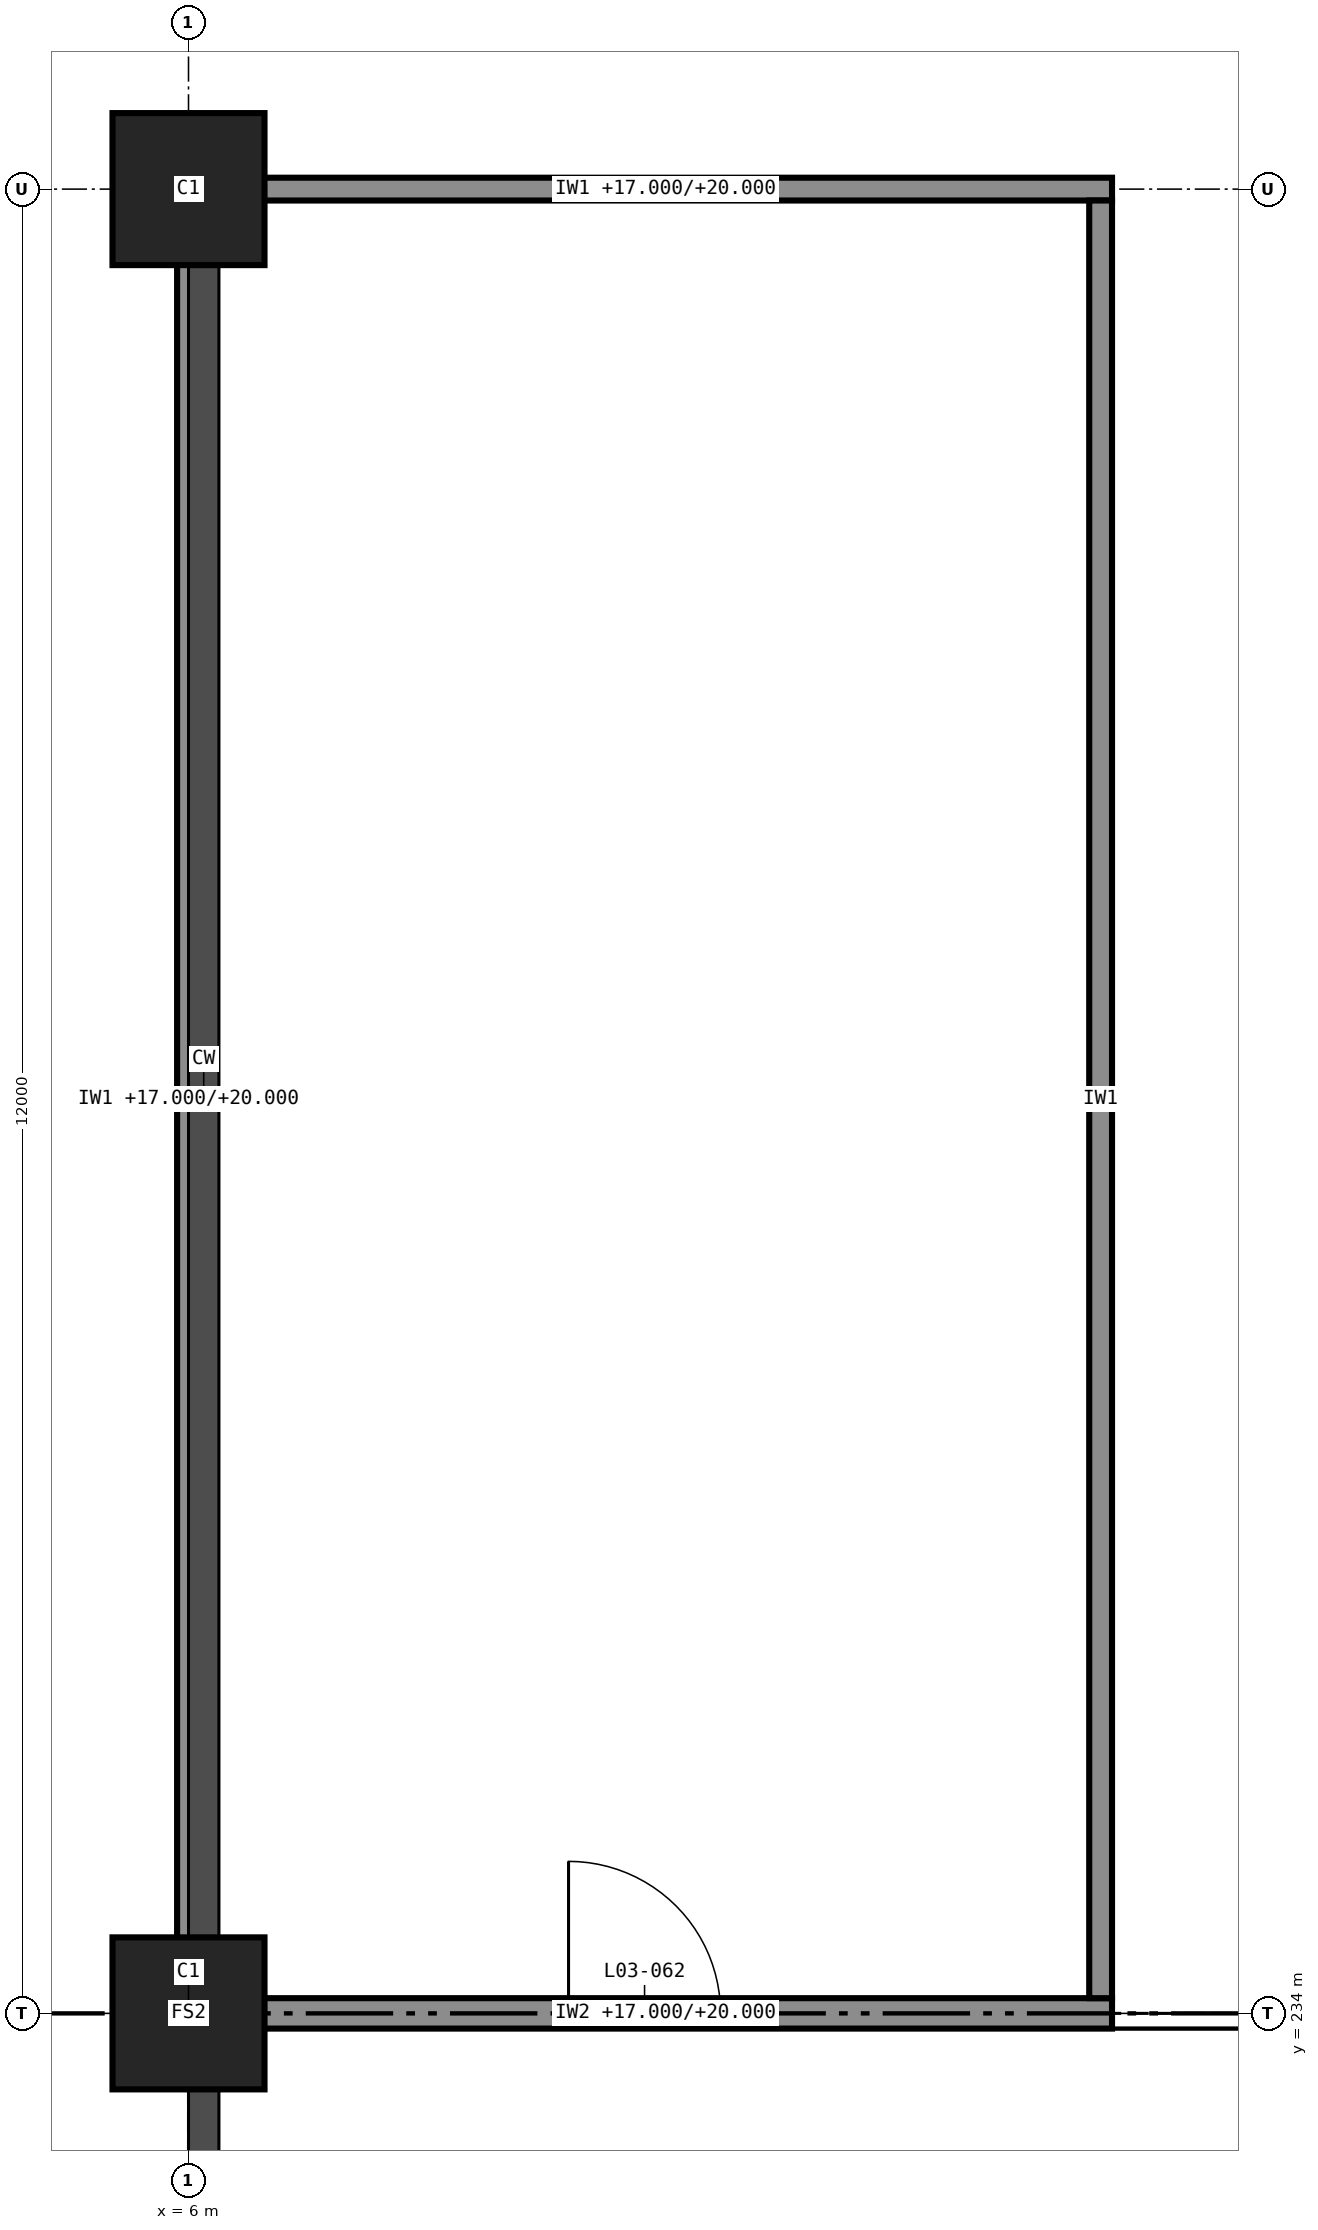
"""IFC4 building model, lengths in metres.
Left out: names, types, materials, properties, quantities, classifications, styles, units other than length and angle.
Written with IfcOpenShell. Run it as: python <this file> out.ifc"""

import sys

from ifc_helpers import new_model, si_unit, direction, frame, frame_2d, origin, origin_2d, place, context, subcontext, project, spatial, rectangle, extrude, element, fill, save


model = new_model("IFC4")
c1 = context("Model", 3, precision=1e-05, world=origin(), true_north=direction((0.0, 1.0)))
c2 = subcontext(c1, "Body", "Model", "MODEL_VIEW")
j1 = project(units=[si_unit("LENGTHUNIT", "METRE"), si_unit("PLANEANGLEUNIT", "RADIAN")], contexts=[c1])
p1 = place(None, origin())
s1 = spatial("IfcSite", under=j1, at=p1, CompositionType="ELEMENT")
p2 = place(p1, origin())
s2 = spatial("IfcBuilding", under=s1, at=p2, CompositionType="ELEMENT")
p3 = place(p2, frame((0.0, 0.0, 17.0)))
s3 = spatial("IfcBuildingStorey", under=s2, at=p3, CompositionType="ELEMENT", Elevation=17.0)
for number, where, z_axis, x_axis in (
    (1, (6.0, 234.0, 0.0), (0.0, 0.0, 1.0), (1.0, 0.0, 0.0)),
    (2, (6.0, 246.0, 0.0), (0.0, 0.0, 1.0), (1.0, 0.0, 0.0)),
):
    element("IfcColumn", number, at=place(p3, frame(where, z_axis=z_axis, x_axis=x_axis)), inside=s3, PredefinedType="COLUMN", context=c2, shape_type="SweptSolid", body=[
        extrude(rectangle(XDim=1.0, YDim=1.0, at=origin_2d()), origin(), (0.0, 0.0, 1.0), 4.0),
    ])
p4 = place(p3, frame((6.2, 234.0, 0.0), z_axis=(0.0, 0.0, 1.0), x_axis=(1.0, 0.0, 0.0)))
e3 = element("IfcWall", 3, at=p4, inside=s3, PredefinedType="PARTITIONING", context=c2, shape_type="SweptSolid", body=[
    extrude(rectangle(XDim=5.875, YDim=0.2, at=frame_2d((2.938, 0.0))), origin(), (0.0, 0.0, 1.0), 3.0),
])
p5 = place(p4, frame((2.3, 0.0, 0.0)))
e4 = element("IfcOpeningElement", 4, at=p5, cuts=e3, PredefinedType="OPENING", context=c2, shape_type="SweptSolid", body=[
    extrude(rectangle(XDim=1.0, YDim=2.1, at=frame_2d((0.5, 1.05))), frame((0.0, 0.11, 0.0), z_axis=(0.0, -1.0, 0.0), x_axis=(1.0, 0.0, 0.0)), (0.0, 0.0, 1.0), 0.22),
])
p6 = place(p3, frame((6.2, 246.0, 0.0), z_axis=(0.0, 0.0, 1.0), x_axis=(1.0, 0.0, 0.0)))
e5 = element("IfcWall", 5, at=p6, inside=s3, PredefinedType="PARTITIONING", context=c2, shape_type="SweptSolid", body=[
    extrude(rectangle(XDim=5.875, YDim=0.15, at=frame_2d((2.938, 0.0))), origin(), (0.0, 0.0, 1.0), 3.0),
])
p7 = place(p3, frame((6.0, 234.1, 0.0), z_axis=(0.0, 0.0, 1.0), x_axis=(0.0, 1.0, 0.0)))
e6 = element("IfcWall", 6, at=p7, inside=s3, PredefinedType="PARTITIONING", context=c2, shape_type="SweptSolid", body=[
    extrude(rectangle(XDim=11.825, YDim=0.15, at=frame_2d((5.913, 0.0))), origin(), (0.0, 0.0, 1.0), 3.0),
])
p8 = place(p3, frame((12.0, 234.1, 0.0), z_axis=(0.0, 0.0, 1.0), x_axis=(0.0, 1.0, 0.0)))
e7 = element("IfcWall", 7, at=p8, inside=s3, PredefinedType="PARTITIONING", context=c2, shape_type="SweptSolid", body=[
    extrude(rectangle(XDim=11.825, YDim=0.15, at=frame_2d((5.913, 0.0))), origin(), (0.0, 0.0, 1.0), 3.8),
])
p9 = place(p5, origin())
e8 = element("IfcDoor", 8, at=p9, inside=s3, OperationType="SINGLE_SWING_RIGHT", PredefinedType="DOOR", context=c2, shape_type="SweptSolid", body=[
    extrude(rectangle(XDim=1.0, YDim=2.1, at=frame_2d((0.5, 1.05))), frame((0.0, 0.025, 0.0), z_axis=(0.0, -1.0, 0.0), x_axis=(1.0, 0.0, 0.0)), (0.0, 0.0, 1.0), 0.05),
])
fill(e4, e8)
save(model, sys.argv[1])
